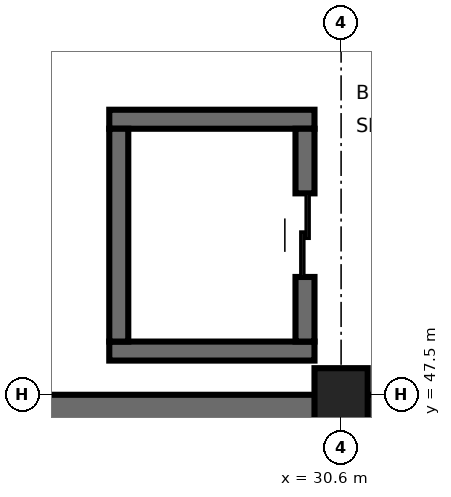
"""IFC4 building model, lengths in metres.
Left out: names, types, materials, properties, quantities, classifications, styles, units other than length and angle.
Written with IfcOpenShell. Run it as: python <this file> out.ifc"""

import sys

from ifc_helpers import new_model, si_unit, direction, frame, frame_2d, origin, origin_2d, place, context, subcontext, project, spatial, rectangle, extrude, element, fill, save


model = new_model("IFC4")
c1 = context("Model", 3, precision=1e-05, world=origin(), true_north=direction((0.0, 1.0)))
c2 = subcontext(c1, "Body", "Model", "MODEL_VIEW")
j1 = project(units=[si_unit("LENGTHUNIT", "METRE"), si_unit("PLANEANGLEUNIT", "RADIAN")], contexts=[c1])
p1 = place(None, origin())
s1 = spatial("IfcSite", under=j1, at=p1, CompositionType="ELEMENT")
p2 = place(p1, origin())
s2 = spatial("IfcBuilding", under=s1, at=p2, CompositionType="ELEMENT")
p3 = place(p2, frame((0.0, 0.0, -5.0)))
s3 = spatial("IfcBuildingStorey", under=s2, at=p3, CompositionType="ELEMENT", Elevation=-5.0)
p4 = place(p3, frame((30.6, 47.5, 0.0), z_axis=(0.0, 0.0, 1.0), x_axis=(1.0, 0.0, 0.0)))
e1 = element("IfcColumn", 1, at=p4, inside=s3, PredefinedType="COLUMN", context=c2, shape_type="SweptSolid", body=[
    extrude(rectangle(XDim=0.7, YDim=0.7, at=origin_2d()), origin(), (0.0, 0.0, 1.0), 5.0),
])
for number, where, z_axis, x_axis in (
    (2, (27.55, 48.075, 0.0), (0.0, 0.0, 1.0), (1.0, 0.0, 0.0)),
    (3, (30.25, 51.125, 0.0), (0.0, 0.0, 1.0), (-1.0, 0.0, 0.0)),
):
    element("IfcWall", number, at=place(p3, frame(where, z_axis=z_axis, x_axis=x_axis)), inside=s3, PredefinedType="SHEAR", context=c2, shape_type="SweptSolid", body=[
        extrude(rectangle(XDim=2.7, YDim=0.25, at=frame_2d((1.35, 0.0))), origin(), (0.0, 0.0, 1.0), 5.0),
    ])
p5 = place(p3, frame((27.675, 51.0, 0.0), z_axis=(0.0, 0.0, 1.0), x_axis=(0.0, -1.0, 0.0)))
e4 = element("IfcWall", 4, at=p5, inside=s3, PredefinedType="SHEAR", context=c2, shape_type="SweptSolid", body=[
    extrude(rectangle(XDim=2.8, YDim=0.25, at=frame_2d((1.4, 0.0))), origin(), (0.0, 0.0, 1.0), 5.0),
])
p6 = place(p3, frame((30.125, 48.2, 0.0), z_axis=(0.0, 0.0, 1.0), x_axis=(0.0, 1.0, 0.0)))
e5 = element("IfcWall", 5, at=p6, inside=s3, PredefinedType="SHEAR", context=c2, shape_type="SweptSolid", body=[
    extrude(rectangle(XDim=2.8, YDim=0.25, at=frame_2d((1.4, 0.0))), origin(), (0.0, 0.0, 1.0), 5.0),
])
p7 = place(p6, frame((0.85, 0.0, 0.0)))
e6 = element("IfcOpeningElement", 6, at=p7, cuts=e5, PredefinedType="OPENING", context=c2, shape_type="SweptSolid", body=[
    extrude(rectangle(XDim=1.1, YDim=2.15, at=frame_2d((0.55, 1.075))), frame((0.0, 0.135, 0.0), z_axis=(0.0, -1.0, 0.0), x_axis=(1.0, 0.0, 0.0)), (0.0, 0.0, 1.0), 0.27),
])
p8 = place(p3, frame((6.182, 47.2, 0.0), z_axis=(0.0, 0.0, 1.0), x_axis=(1.0, 0.0, 0.0)))
e7 = element("IfcWall", 7, at=p8, inside=s3, PredefinedType="SHEAR", context=c2, shape_type="SweptSolid", body=[
    extrude(rectangle(XDim=41.218, YDim=0.6, at=frame_2d((20.609, 0.0))), origin(), (0.0, 0.0, 1.0), 4.7),
])
p9 = place(p7, origin())
e8 = element("IfcDoor", 8, at=p9, inside=s3, OperationType="DOUBLE_DOOR_SLIDING", PredefinedType="DOOR", context=c2, shape_type="SweptSolid", body=[
    extrude(rectangle(XDim=1.1, YDim=2.15, at=frame_2d((0.55, 1.075))), frame((0.0, 0.025, 0.0), z_axis=(0.0, -1.0, 0.0), x_axis=(1.0, 0.0, 0.0)), (0.0, 0.0, 1.0), 0.05),
])
fill(e6, e8)
save(model, sys.argv[1])
